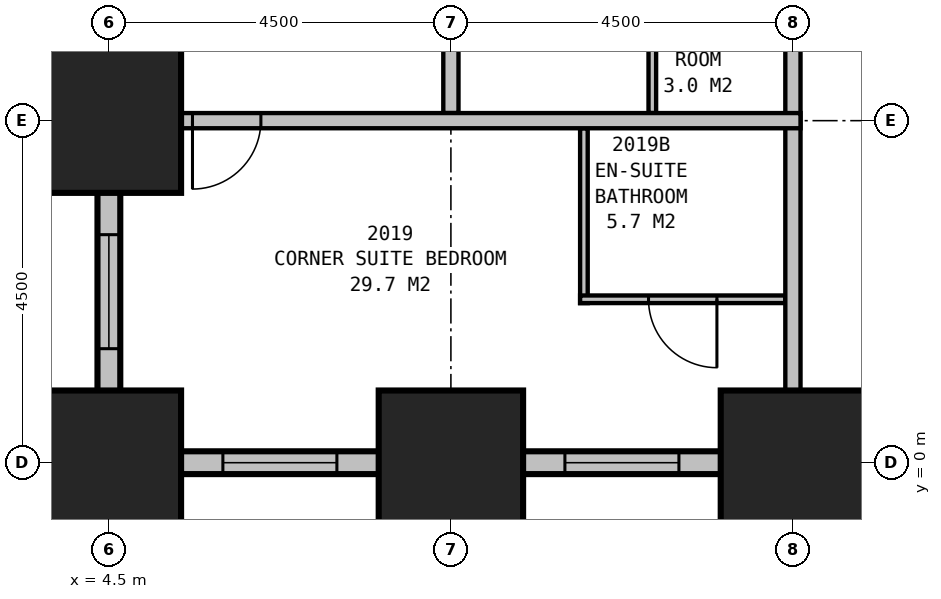
"""IFC4 building model, lengths in metres.
Left out: names, types, materials, properties, quantities, classifications, styles, units other than length and angle.
Written with IfcOpenShell. Run it as: python <this file> out.ifc"""

import sys

from ifc_helpers import new_model, si_unit, direction, frame, frame_2d, origin, origin_2d, place, context, subcontext, project, spatial, rectangle, extrude, element, fill, save


model = new_model("IFC4")
c1 = context("Model", 3, precision=1e-05, world=origin(), true_north=direction((0.0, 1.0)))
c2 = subcontext(c1, "Body", "Model", "MODEL_VIEW")
j1 = project(units=[si_unit("LENGTHUNIT", "METRE"), si_unit("PLANEANGLEUNIT", "RADIAN")], contexts=[c1])
p1 = place(None, origin())
s1 = spatial("IfcSite", under=j1, at=p1, CompositionType="ELEMENT")
p2 = place(p1, origin())
s2 = spatial("IfcBuilding", under=s1, at=p2, CompositionType="ELEMENT")
p3 = place(p2, frame((0.0, 0.0, 82.2)))
s3 = spatial("IfcBuildingStorey", under=s2, at=p3, CompositionType="ELEMENT", Elevation=82.2)
for number, where, z_axis, x_axis in (
    (1, (4.5, 4.5, 0.0), (0.0, 0.0, 1.0), (1.0, 0.0, 0.0)),
    (2, (4.5, 0.0, 0.0), (0.0, 0.0, 1.0), (1.0, 0.0, 0.0)),
    (3, (9.0, 0.0, 0.0), (0.0, 0.0, 1.0), (1.0, 0.0, 0.0)),
    (4, (13.5, 0.0, 0.0), (0.0, 0.0, 1.0), (1.0, 0.0, 0.0)),
):
    element("IfcColumn", number, at=place(p3, frame(where, z_axis=z_axis, x_axis=x_axis)), inside=s3, PredefinedType="COLUMN", context=c2, shape_type="SweptSolid", body=[
        extrude(rectangle(XDim=1.9, YDim=1.9, at=origin_2d()), origin(), (0.0, 0.0, 1.0), 3.5),
    ])
p4 = place(p3, frame((0.35, 4.5, 0.0), z_axis=(0.0, 0.0, 1.0), x_axis=(1.0, 0.0, 0.0)))
e5 = element("IfcWall", 5, at=p4, inside=s3, PredefinedType="STANDARD", context=c2, shape_type="SweptSolid", body=[
    extrude(rectangle(XDim=4.3, YDim=0.3, at=frame_2d((2.15, 0.0))), origin(), (0.0, 0.0, 1.0), 2.1),
])
p5 = place(p4, frame((1.4, 0.0, 0.5)))
e6 = element("IfcOpeningElement", 6, at=p5, cuts=e5, PredefinedType="OPENING", context=c2, shape_type="SweptSolid", body=[
    extrude(rectangle(XDim=1.5, YDim=1.4, at=frame_2d((0.75, 0.7))), frame((0.0, 0.16, 0.0), z_axis=(0.0, -1.0, 0.0), x_axis=(1.0, 0.0, 0.0)), (0.0, 0.0, 1.0), 0.32),
])
p6 = place(p3, frame((4.5, 4.65, 0.0), z_axis=(0.0, 0.0, 1.0), x_axis=(0.0, -1.0, 0.0)))
e7 = element("IfcWall", 7, at=p6, inside=s3, PredefinedType="STANDARD", context=c2, shape_type="SweptSolid", body=[
    extrude(rectangle(XDim=4.8, YDim=0.3, at=frame_2d((2.4, 0.0))), origin(), (0.0, 0.0, 1.0), 2.1),
])
p7 = place(p6, frame((1.65, 0.0, 0.5)))
e8 = element("IfcOpeningElement", 8, at=p7, cuts=e7, PredefinedType="OPENING", context=c2, shape_type="SweptSolid", body=[
    extrude(rectangle(XDim=1.5, YDim=1.4, at=frame_2d((0.75, 0.7))), frame((0.0, 0.16, 0.0), z_axis=(0.0, -1.0, 0.0), x_axis=(1.0, 0.0, 0.0)), (0.0, 0.0, 1.0), 0.32),
])
p8 = place(p3, frame((4.35, 0.0, 0.0), z_axis=(0.0, 0.0, 1.0), x_axis=(1.0, 0.0, 0.0)))
e9 = element("IfcWall", 9, at=p8, inside=s3, PredefinedType="STANDARD", context=c2, shape_type="SweptSolid", body=[
    extrude(rectangle(XDim=40.8, YDim=0.3, at=frame_2d((20.4, 0.0))), origin(), (0.0, 0.0, 1.0), 2.1),
])
p9 = place(p8, frame((1.65, 0.0, 0.5)))
e10 = element("IfcOpeningElement", 10, at=p9, cuts=e9, PredefinedType="OPENING", context=c2, shape_type="SweptSolid", body=[
    extrude(rectangle(XDim=1.5, YDim=1.4, at=frame_2d((0.75, 0.7))), frame((0.0, 0.16, 0.0), z_axis=(0.0, -1.0, 0.0), x_axis=(1.0, 0.0, 0.0)), (0.0, 0.0, 1.0), 0.32),
])
p10 = place(p8, frame((6.15, 0.0, 0.5)))
e11 = element("IfcOpeningElement", 11, at=p10, cuts=e9, PredefinedType="OPENING", context=c2, shape_type="SweptSolid", body=[
    extrude(rectangle(XDim=1.5, YDim=1.4, at=frame_2d((0.75, 0.7))), frame((0.0, 0.16, 0.0), z_axis=(0.0, -1.0, 0.0), x_axis=(1.0, 0.0, 0.0)), (0.0, 0.0, 1.0), 0.32),
])
p11 = place(p8, frame((10.65, 0.0, 0.5)))
e12 = element("IfcOpeningElement", 12, at=p11, cuts=e9, PredefinedType="OPENING", context=c2, shape_type="SweptSolid", body=[
    extrude(rectangle(XDim=1.5, YDim=1.4, at=frame_2d((0.75, 0.7))), frame((0.0, 0.16, 0.0), z_axis=(0.0, -1.0, 0.0), x_axis=(1.0, 0.0, 0.0)), (0.0, 0.0, 1.0), 0.32),
])
p12 = place(p8, frame((15.15, 0.0, 0.5)))
e13 = element("IfcOpeningElement", 13, at=p12, cuts=e9, PredefinedType="OPENING", context=c2, shape_type="SweptSolid", body=[
    extrude(rectangle(XDim=1.5, YDim=1.4, at=frame_2d((0.75, 0.7))), frame((0.0, 0.16, 0.0), z_axis=(0.0, -1.0, 0.0), x_axis=(1.0, 0.0, 0.0)), (0.0, 0.0, 1.0), 0.32),
])
p13 = place(p8, frame((19.65, 0.0, 0.5)))
e14 = element("IfcOpeningElement", 14, at=p13, cuts=e9, PredefinedType="OPENING", context=c2, shape_type="SweptSolid", body=[
    extrude(rectangle(XDim=1.5, YDim=1.4, at=frame_2d((0.75, 0.7))), frame((0.0, 0.16, 0.0), z_axis=(0.0, -1.0, 0.0), x_axis=(1.0, 0.0, 0.0)), (0.0, 0.0, 1.0), 0.32),
])
p14 = place(p8, frame((24.15, 0.0, 0.5)))
e15 = element("IfcOpeningElement", 15, at=p14, cuts=e9, PredefinedType="OPENING", context=c2, shape_type="SweptSolid", body=[
    extrude(rectangle(XDim=1.5, YDim=1.4, at=frame_2d((0.75, 0.7))), frame((0.0, 0.16, 0.0), z_axis=(0.0, -1.0, 0.0), x_axis=(1.0, 0.0, 0.0)), (0.0, 0.0, 1.0), 0.32),
])
p15 = place(p8, frame((28.65, 0.0, 0.5)))
e16 = element("IfcOpeningElement", 16, at=p15, cuts=e9, PredefinedType="OPENING", context=c2, shape_type="SweptSolid", body=[
    extrude(rectangle(XDim=1.5, YDim=1.4, at=frame_2d((0.75, 0.7))), frame((0.0, 0.16, 0.0), z_axis=(0.0, -1.0, 0.0), x_axis=(1.0, 0.0, 0.0)), (0.0, 0.0, 1.0), 0.32),
])
p16 = place(p8, frame((33.15, 0.0, 0.5)))
e17 = element("IfcOpeningElement", 17, at=p16, cuts=e9, PredefinedType="OPENING", context=c2, shape_type="SweptSolid", body=[
    extrude(rectangle(XDim=1.5, YDim=1.4, at=frame_2d((0.75, 0.7))), frame((0.0, 0.16, 0.0), z_axis=(0.0, -1.0, 0.0), x_axis=(1.0, 0.0, 0.0)), (0.0, 0.0, 1.0), 0.32),
])
p17 = place(p8, frame((37.65, 0.0, 0.5)))
e18 = element("IfcOpeningElement", 18, at=p17, cuts=e9, PredefinedType="OPENING", context=c2, shape_type="SweptSolid", body=[
    extrude(rectangle(XDim=1.5, YDim=1.4, at=frame_2d((0.75, 0.7))), frame((0.0, 0.16, 0.0), z_axis=(0.0, -1.0, 0.0), x_axis=(1.0, 0.0, 0.0)), (0.0, 0.0, 1.0), 0.32),
])
p18 = place(p3, frame((4.017, 36.149, 0.0), z_axis=(0.0, 0.0, 1.0), x_axis=(-0.110433201132, -0.993883548555, 0.0)))
e19 = element("IfcWall", 19, at=p18, inside=s3, PredefinedType="STANDARD", context=c2, shape_type="SweptSolid", body=[
    extrude(rectangle(XDim=31.994, YDim=0.3, at=frame_2d((15.997, 0.0))), origin(), (0.0, 0.0, 1.0), 2.1),
])
p19 = place(p18, frame((1.664, 0.0, 0.5)))
e20 = element("IfcOpeningElement", 20, at=p19, cuts=e19, PredefinedType="OPENING", context=c2, shape_type="SweptSolid", body=[
    extrude(rectangle(XDim=1.5, YDim=1.4, at=frame_2d((0.75, 0.7))), frame((0.0, 0.16, 0.0), z_axis=(0.0, -1.0, 0.0), x_axis=(1.0, 0.0, 0.0)), (0.0, 0.0, 1.0), 0.32),
])
p20 = place(p18, frame((6.192, 0.0, 0.5)))
e21 = element("IfcOpeningElement", 21, at=p20, cuts=e19, PredefinedType="OPENING", context=c2, shape_type="SweptSolid", body=[
    extrude(rectangle(XDim=1.5, YDim=1.4, at=frame_2d((0.75, 0.7))), frame((0.0, 0.16, 0.0), z_axis=(0.0, -1.0, 0.0), x_axis=(1.0, 0.0, 0.0)), (0.0, 0.0, 1.0), 0.32),
])
p21 = place(p18, frame((10.719, 0.0, 0.5)))
e22 = element("IfcOpeningElement", 22, at=p21, cuts=e19, PredefinedType="OPENING", context=c2, shape_type="SweptSolid", body=[
    extrude(rectangle(XDim=1.5, YDim=1.4, at=frame_2d((0.75, 0.7))), frame((0.0, 0.16, 0.0), z_axis=(0.0, -1.0, 0.0), x_axis=(1.0, 0.0, 0.0)), (0.0, 0.0, 1.0), 0.32),
])
p22 = place(p18, frame((15.247, 0.0, 0.5)))
e23 = element("IfcOpeningElement", 23, at=p22, cuts=e19, PredefinedType="OPENING", context=c2, shape_type="SweptSolid", body=[
    extrude(rectangle(XDim=1.5, YDim=1.4, at=frame_2d((0.75, 0.7))), frame((0.0, 0.16, 0.0), z_axis=(0.0, -1.0, 0.0), x_axis=(1.0, 0.0, 0.0)), (0.0, 0.0, 1.0), 0.32),
])
p23 = place(p18, frame((19.775, 0.0, 0.5)))
e24 = element("IfcOpeningElement", 24, at=p23, cuts=e19, PredefinedType="OPENING", context=c2, shape_type="SweptSolid", body=[
    extrude(rectangle(XDim=1.5, YDim=1.4, at=frame_2d((0.75, 0.7))), frame((0.0, 0.16, 0.0), z_axis=(0.0, -1.0, 0.0), x_axis=(1.0, 0.0, 0.0)), (0.0, 0.0, 1.0), 0.32),
])
p24 = place(p18, frame((24.302, 0.0, 0.5)))
e25 = element("IfcOpeningElement", 25, at=p24, cuts=e19, PredefinedType="OPENING", context=c2, shape_type="SweptSolid", body=[
    extrude(rectangle(XDim=1.5, YDim=1.4, at=frame_2d((0.75, 0.7))), frame((0.0, 0.16, 0.0), z_axis=(0.0, -1.0, 0.0), x_axis=(1.0, 0.0, 0.0)), (0.0, 0.0, 1.0), 0.32),
])
p25 = place(p18, frame((28.83, 0.0, 0.5)))
e26 = element("IfcOpeningElement", 26, at=p25, cuts=e19, PredefinedType="OPENING", context=c2, shape_type="SweptSolid", body=[
    extrude(rectangle(XDim=1.5, YDim=1.4, at=frame_2d((0.75, 0.7))), frame((0.0, 0.16, 0.0), z_axis=(0.0, -1.0, 0.0), x_axis=(1.0, 0.0, 0.0)), (0.0, 0.0, 1.0), 0.32),
])
p26 = place(p3, frame((13.5, 11.2, 0.0), z_axis=(0.0, 0.0, 1.0), x_axis=(0.0, -1.0, 0.0)))
e27 = element("IfcWall", 27, at=p26, inside=s3, PredefinedType="PARTITIONING", context=c2, shape_type="SweptSolid", body=[
    extrude(rectangle(XDim=11.2, YDim=0.2, at=frame_2d((5.6, 0.0))), origin(), (0.0, 0.0, 1.0), 2.2),
])
p27 = place(p3, frame((13.6, 4.5, 0.0), z_axis=(0.0, 0.0, 1.0), x_axis=(-1.0, 0.0, 0.0)))
e28 = element("IfcWall", 28, at=p27, inside=s3, PredefinedType="PARTITIONING", context=c2, shape_type="SweptSolid", body=[
    extrude(rectangle(XDim=9.1, YDim=0.2, at=frame_2d((4.55, 0.0))), origin(), (0.0, 0.0, 1.0), 3.25),
])
p28 = place(p27, frame((7.1, 0.0, 0.0)))
e29 = element("IfcOpeningElement", 29, at=p28, cuts=e28, PredefinedType="OPENING", context=c2, shape_type="SweptSolid", body=[
    extrude(rectangle(XDim=0.9, YDim=2.1, at=frame_2d((0.45, 1.05))), frame((0.0, 0.11, 0.0), z_axis=(0.0, -1.0, 0.0), x_axis=(1.0, 0.0, 0.0)), (0.0, 0.0, 1.0), 0.22),
])
p29 = place(p3, frame((9.0, 4.6, 0.0), z_axis=(0.0, 0.0, 1.0), x_axis=(0.0, 1.0, 0.0)))
e30 = element("IfcWall", 30, at=p29, inside=s3, PredefinedType="PARTITIONING", context=c2, shape_type="SweptSolid", body=[
    extrude(rectangle(XDim=8.8, YDim=0.2, at=frame_2d((4.4, 0.0))), origin(), (0.0, 0.0, 1.0), 2.2),
])
p30 = place(p29, frame((4.05, 0.0, 0.0)))
e31 = element("IfcOpeningElement", 31, at=p30, cuts=e30, PredefinedType="OPENING", context=c2, shape_type="SweptSolid", body=[
    extrude(rectangle(XDim=0.9, YDim=2.1, at=frame_2d((0.45, 1.05))), frame((0.0, 0.11, 0.0), z_axis=(0.0, -1.0, 0.0), x_axis=(1.0, 0.0, 0.0)), (0.0, 0.0, 1.0), 0.22),
])
p31 = place(p3, frame((11.65, 4.6, 0.0), z_axis=(0.0, 0.0, 1.0), x_axis=(0.0, 1.0, 0.0)))
e32 = element("IfcWall", 32, at=p31, inside=s3, PredefinedType="PLUMBINGWALL", context=c2, shape_type="SweptSolid", body=[
    extrude(rectangle(XDim=2.0, YDim=0.1, at=frame_2d((1.0, 0.0))), origin(), (0.0, 0.0, 1.0), 3.25),
])
p32 = place(p3, frame((10.75, 4.4, 0.0), z_axis=(0.0, 0.0, 1.0), x_axis=(0.0, -1.0, 0.0)))
e33 = element("IfcWall", 33, at=p32, inside=s3, PredefinedType="PLUMBINGWALL", context=c2, shape_type="SweptSolid", body=[
    extrude(rectangle(XDim=2.3, YDim=0.1, at=frame_2d((1.15, 0.0))), origin(), (0.0, 0.0, 1.0), 3.25),
])
p33 = place(p3, frame((13.4, 2.15, 0.0), z_axis=(0.0, 0.0, 1.0), x_axis=(-1.0, 0.0, 0.0)))
e34 = element("IfcWall", 34, at=p33, inside=s3, PredefinedType="PLUMBINGWALL", context=c2, shape_type="SweptSolid", body=[
    extrude(rectangle(XDim=2.7, YDim=0.1, at=frame_2d((1.35, 0.0))), origin(), (0.0, 0.0, 1.0), 3.25),
])
p34 = place(p33, frame((0.9, 0.0, 0.0)))
e35 = element("IfcOpeningElement", 35, at=p34, cuts=e34, PredefinedType="OPENING", context=c2, shape_type="SweptSolid", body=[
    extrude(rectangle(XDim=0.9, YDim=2.1, at=frame_2d((0.45, 1.05))), frame((0.0, 0.06, 0.0), z_axis=(0.0, -1.0, 0.0), x_axis=(1.0, 0.0, 0.0)), (0.0, 0.0, 1.0), 0.12),
])
p35 = place(p7, origin())
e36 = element("IfcWindow", 36, at=p35, inside=s3, PartitioningType="SINGLE_PANEL", PredefinedType="WINDOW", context=c2, shape_type="SweptSolid", body=[
    extrude(rectangle(XDim=1.5, YDim=1.4, at=frame_2d((0.75, 0.7))), frame((0.0, 0.03, 0.0), z_axis=(0.0, -1.0, 0.0), x_axis=(1.0, 0.0, 0.0)), (0.0, 0.0, 1.0), 0.06),
])
fill(e8, e36)
p36 = place(p9, origin())
e37 = element("IfcWindow", 37, at=p36, inside=s3, PartitioningType="SINGLE_PANEL", PredefinedType="WINDOW", context=c2, shape_type="SweptSolid", body=[
    extrude(rectangle(XDim=1.5, YDim=1.4, at=frame_2d((0.75, 0.7))), frame((0.0, 0.03, 0.0), z_axis=(0.0, -1.0, 0.0), x_axis=(1.0, 0.0, 0.0)), (0.0, 0.0, 1.0), 0.06),
])
fill(e10, e37)
p37 = place(p10, origin())
e38 = element("IfcWindow", 38, at=p37, inside=s3, PartitioningType="SINGLE_PANEL", PredefinedType="WINDOW", context=c2, shape_type="SweptSolid", body=[
    extrude(rectangle(XDim=1.5, YDim=1.4, at=frame_2d((0.75, 0.7))), frame((0.0, 0.03, 0.0), z_axis=(0.0, -1.0, 0.0), x_axis=(1.0, 0.0, 0.0)), (0.0, 0.0, 1.0), 0.06),
])
fill(e11, e38)
p38 = place(p28, origin())
e39 = element("IfcDoor", 39, at=p38, inside=s3, OperationType="SINGLE_SWING_RIGHT", PredefinedType="DOOR", context=c2, shape_type="SweptSolid", body=[
    extrude(rectangle(XDim=0.9, YDim=2.1, at=frame_2d((0.45, 1.05))), frame((0.0, 0.025, 0.0), z_axis=(0.0, -1.0, 0.0), x_axis=(1.0, 0.0, 0.0)), (0.0, 0.0, 1.0), 0.05),
])
fill(e29, e39)
p39 = place(p34, origin())
e40 = element("IfcDoor", 40, at=p39, inside=s3, OperationType="SINGLE_SWING_LEFT", PredefinedType="DOOR", context=c2, shape_type="SweptSolid", body=[
    extrude(rectangle(XDim=0.9, YDim=2.1, at=frame_2d((0.45, 1.05))), frame((0.0, 0.025, 0.0), z_axis=(0.0, -1.0, 0.0), x_axis=(1.0, 0.0, 0.0)), (0.0, 0.0, 1.0), 0.05),
])
fill(e35, e40)
save(model, sys.argv[1])
